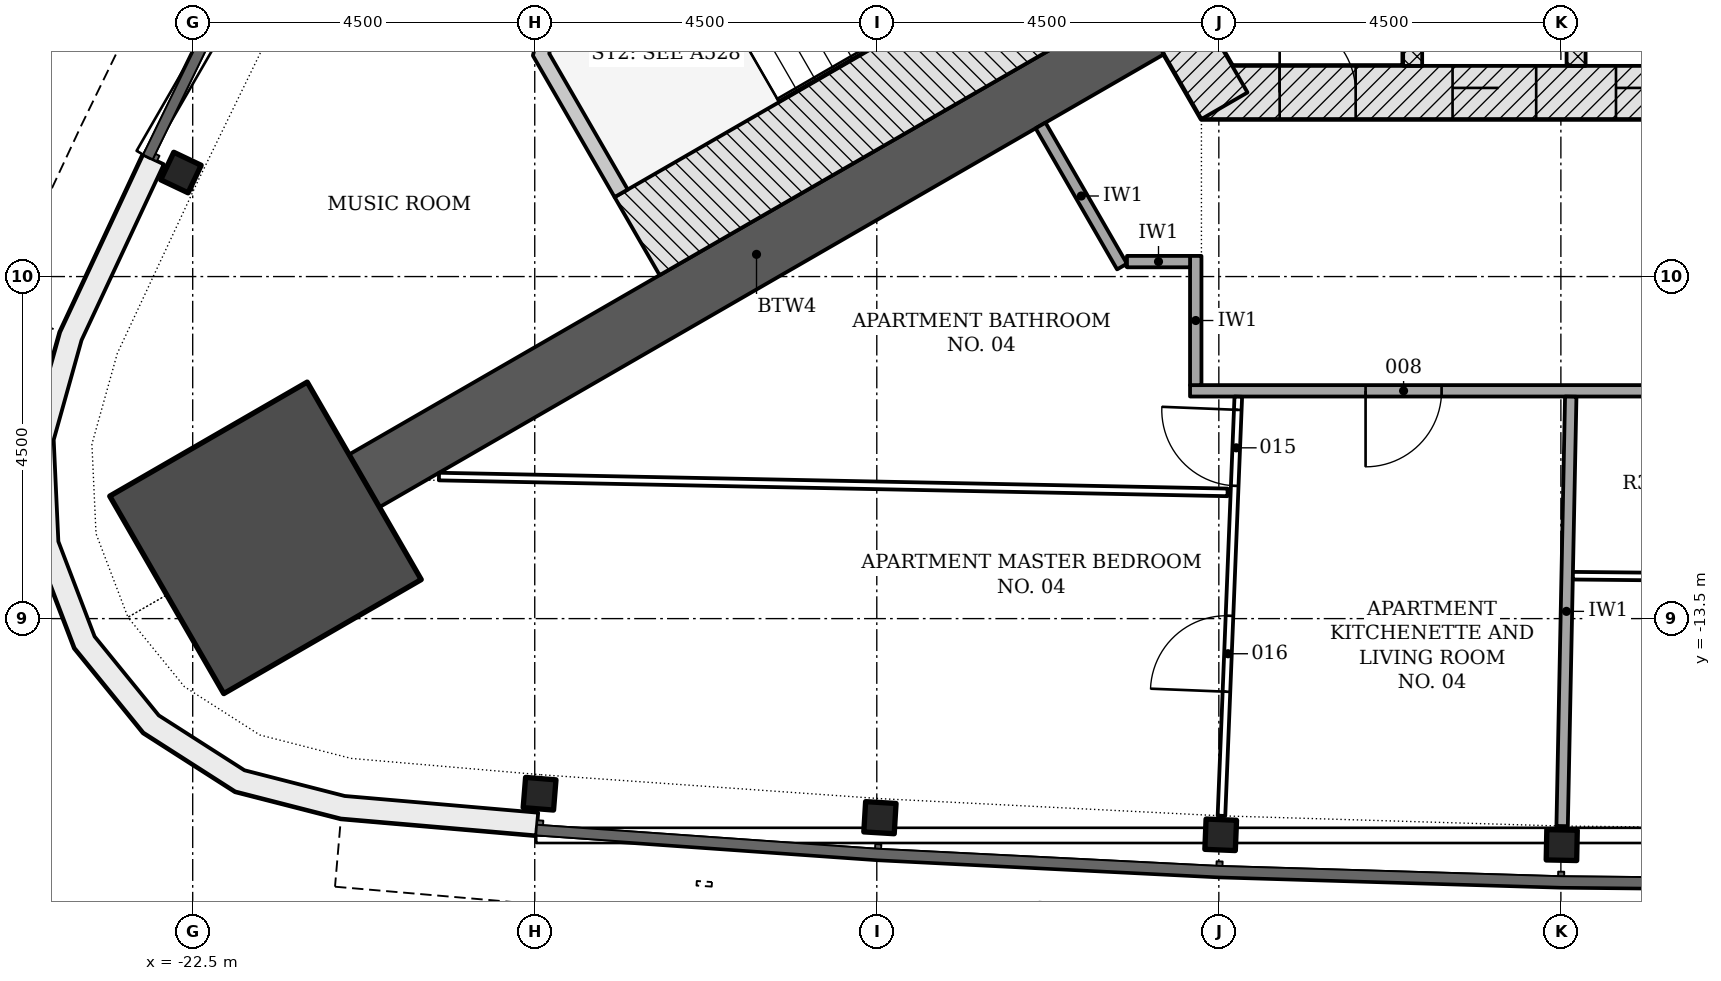
"""IFC4 building model, lengths in metres.
Left out: names, types, materials, properties, quantities, classifications, styles, units other than length and angle.
Written with IfcOpenShell. Run it as: python <this file> out.ifc"""

import sys

from ifc_helpers import new_model, si_unit, direction, frame, frame_2d, origin, origin_2d, place, context, subcontext, project, spatial, polyline, rectangle, i_section, outline, extrude, element, fill, save


model = new_model("IFC4")
c1 = context("Model", 3, precision=1e-05, world=origin(), true_north=direction((0.0, 1.0)))
c2 = subcontext(c1, "Body", "Model", "MODEL_VIEW")
j1 = project(units=[si_unit("LENGTHUNIT", "METRE"), si_unit("PLANEANGLEUNIT", "RADIAN")], contexts=[c1])
p1 = place(None, origin())
s1 = spatial("IfcSite", under=j1, at=p1, CompositionType="ELEMENT")
p2 = place(p1, origin())
s2 = spatial("IfcBuilding", under=s1, at=p2, CompositionType="ELEMENT")
p3 = place(p2, frame((0.0, 0.0, 109.5)))
s3 = spatial("IfcBuildingStorey", under=s2, at=p3, CompositionType="ELEMENT", Elevation=109.5)
p4 = place(p3, frame((-9.229, -6.578, -0.2), z_axis=(0.0, 0.0, 1.0), x_axis=(1.0, 0.0, 0.0)))
e1 = element("IfcWall", 1, at=p4, inside=s3, PredefinedType="SHEAR", context=c2, shape_type="SweptSolid", body=[
    extrude(rectangle(XDim=18.458, YDim=0.7, at=frame_2d((9.229, 0.0))), origin(), (0.0, 0.0, 1.0), 3.6),
])
p5 = place(p4, frame((3.304, 0.0, 0.2)))
e2 = element("IfcOpeningElement", 2, at=p5, cuts=e1, PredefinedType="OPENING", context=c2, shape_type="SweptSolid", body=[
    extrude(rectangle(XDim=1.1, YDim=2.1, at=frame_2d((0.55, 1.05))), frame((0.0, 0.36, 0.0), z_axis=(0.0, -1.0, 0.0), x_axis=(1.0, 0.0, 0.0)), (0.0, 0.0, 1.0), 0.72),
])
p6 = place(p4, frame((5.454, 0.0, 0.2)))
e3 = element("IfcOpeningElement", 3, at=p6, cuts=e1, PredefinedType="OPENING", context=c2, shape_type="SweptSolid", body=[
    extrude(rectangle(XDim=1.1, YDim=2.1, at=frame_2d((0.55, 1.05))), frame((0.0, 0.36, 0.0), z_axis=(0.0, -1.0, 0.0), x_axis=(1.0, 0.0, 0.0)), (0.0, 0.0, 1.0), 0.72),
])
p7 = place(p4, frame((7.604, 0.0, 0.2)))
e4 = element("IfcOpeningElement", 4, at=p7, cuts=e1, PredefinedType="OPENING", context=c2, shape_type="SweptSolid", body=[
    extrude(rectangle(XDim=1.1, YDim=2.1, at=frame_2d((0.55, 1.05))), frame((0.0, 0.36, 0.0), z_axis=(0.0, -1.0, 0.0), x_axis=(1.0, 0.0, 0.0)), (0.0, 0.0, 1.0), 0.72),
])
p8 = place(p4, frame((9.754, 0.0, 0.2)))
e5 = element("IfcOpeningElement", 5, at=p8, cuts=e1, PredefinedType="OPENING", context=c2, shape_type="SweptSolid", body=[
    extrude(rectangle(XDim=1.1, YDim=2.1, at=frame_2d((0.55, 1.05))), frame((0.0, 0.36, 0.0), z_axis=(0.0, -1.0, 0.0), x_axis=(1.0, 0.0, 0.0)), (0.0, 0.0, 1.0), 0.72),
])
p9 = place(p4, frame((11.904, 0.0, 0.2)))
e6 = element("IfcOpeningElement", 6, at=p9, cuts=e1, PredefinedType="OPENING", context=c2, shape_type="SweptSolid", body=[
    extrude(rectangle(XDim=1.1, YDim=2.1, at=frame_2d((0.55, 1.05))), frame((0.0, 0.36, 0.0), z_axis=(0.0, -1.0, 0.0), x_axis=(1.0, 0.0, 0.0)), (0.0, 0.0, 1.0), 0.72),
])
p10 = place(p4, frame((14.054, 0.0, 0.2)))
e7 = element("IfcOpeningElement", 7, at=p10, cuts=e1, PredefinedType="OPENING", context=c2, shape_type="SweptSolid", body=[
    extrude(rectangle(XDim=1.1, YDim=2.1, at=frame_2d((0.55, 1.05))), frame((0.0, 0.36, 0.0), z_axis=(0.0, -1.0, 0.0), x_axis=(1.0, 0.0, 0.0)), (0.0, 0.0, 1.0), 0.72),
])
p11 = place(p4, frame((1.029, 0.0, 0.2)))
e8 = element("IfcOpeningElement", 8, at=p11, cuts=e1, PredefinedType="OPENING", context=c2, shape_type="SweptSolid", body=[
    extrude(rectangle(XDim=1.0, YDim=2.1, at=frame_2d((0.5, 1.05))), frame((0.0, 0.36, 0.0), z_axis=(0.0, -1.0, 0.0), x_axis=(1.0, 0.0, 0.0)), (0.0, 0.0, 1.0), 0.72),
])
p12 = place(p3, frame((-10.311, -4.353, -0.2), z_axis=(0.0, 0.0, 1.0), x_axis=(0.500042739161, -0.866000726912, 0.0)))
e9 = element("IfcWall", 9, at=p12, inside=s3, PredefinedType="SHEAR", context=c2, shape_type="SweptSolid", body=[
    extrude(rectangle(XDim=2.771, YDim=0.7, at=frame_2d((1.386, 0.0))), origin(), (0.0, 0.0, 1.0), 3.6),
])
p13 = place(p3, frame((-9.922, -5.728, -0.2), z_axis=(0.0, 0.0, 1.0), x_axis=(-0.866027307971, -0.499996701837, 0.0)))
e10 = element("IfcWall", 10, at=p13, inside=s3, PredefinedType="SHEAR", context=c2, shape_type="SweptSolid", body=[
    extrude(rectangle(XDim=11.918, YDim=0.8, at=frame_2d((5.959, 0.0))), origin(), (0.0, 0.0, 1.0), 3.6),
])
p14 = place(p3, frame((-21.542, -12.438, -0.2), z_axis=(0.0, 0.0, 1.0), x_axis=(-0.866025403784, -0.5, 0.0)))
e11 = element("IfcColumn", 11, at=p14, inside=s3, PredefinedType="COLUMN", context=c2, shape_type="SweptSolid", body=[
    extrude(rectangle(XDim=3.0, YDim=3.0, at=origin_2d()), origin(), (0.0, 0.0, 1.0), 3.6),
])
for number, where, z_axis, x_axis in (
    (12, (-22.655, -7.632, -0.2), (0.0, 0.0, 1.0), (-0.429, -0.903, 0.0)),
    (13, (-17.937, -15.804, -0.2), (0.0, 0.0, 1.0), (0.997, -0.08, 0.0)),
    (14, (-13.459, -16.119, -0.2), (0.0, 0.0, 1.0), (0.998, -0.06, 0.0)),
    (15, (-8.976, -16.344, -0.2), (0.0, 0.0, 1.0), (0.999, -0.04, 0.0)),
    (16, (-4.489, -16.479, -0.2), (0.0, 0.0, 1.0), (1.0, -0.02, 0.0)),
):
    element("IfcColumn", number, at=place(p3, frame(where, z_axis=z_axis, x_axis=x_axis)), inside=s3, PredefinedType="COLUMN", context=c2, shape_type="SweptSolid", body=[
        extrude(i_section(OverallWidth=0.401, OverallDepth=0.399, WebThickness=0.025, FlangeThickness=0.04, FilletRadius=0.015, at=origin_2d()), origin(), (0.0, 0.0, 1.0), 3.6),
    ])
p15 = place(p3, origin())
e17 = element("IfcWall", 17, at=p15, inside=s3, PredefinedType="NOTDEFINED", context=c2, shape_type="SweptSolid", body=[
    extrude(outline(polyline([(-23.152, -7.396), (-24.245, -9.732), (-24.631, -11.114), (-24.565, -12.547), (-24.054, -13.887), (-23.148, -15.0), (-21.94, -15.774), (-20.551, -16.13), (-17.981, -16.352), (-17.955, -16.053), (-20.5, -15.833), (-21.819, -15.495), (-22.946, -14.774), (-23.791, -13.735), (-24.267, -12.485), (-24.329, -11.148), (-23.962, -9.837), (-22.88, -7.523), (-23.152, -7.396)])), origin(), (0.0, 0.0, 1.0), 3.3),
])
for number, where, z_axis, x_axis in (
    (18, (-6.45, -6.228, -0.2), (0.0, 0.0, 1.0), (0.0, 1.0, 0.0)),
    (19, (-4.3, -6.228, -0.2), (0.0, 0.0, 1.0), (0.0, 1.0, 0.0)),
):
    element("IfcWall", number, at=place(p3, frame(where, z_axis=z_axis, x_axis=x_axis)), inside=s3, PredefinedType="PARTITIONING", context=c2, shape_type="SweptSolid", body=[
        extrude(rectangle(XDim=2.5, YDim=0.25, at=frame_2d((1.25, 0.0))), origin(), (0.0, 0.0, 1.0), 3.6),
    ])
p16 = place(p3, frame((-10.418, -4.868, -0.2), z_axis=(0.0, 0.0, 1.0), x_axis=(-0.866018442252, -0.500012057535, 0.0)))
e20 = element("IfcWall", 20, at=p16, inside=s3, PredefinedType="SHEAR", context=c2, shape_type="SweptSolid", body=[
    extrude(rectangle(XDim=7.2, YDim=1.186, at=frame_2d((3.6, 0.0))), origin(), (0.0, 0.0, 1.0), 3.6),
])
p17 = place(p3, frame((0.0, 0.0, -0.2)))
e21 = element("IfcWall", 21, at=p17, inside=s3, PredefinedType="SHEAR", context=c2, shape_type="SweptSolid", body=[
    extrude(outline(polyline([(-17.439, -3.907), (-18.025, -6.093), (-16.95, -7.955), (-16.777, -7.855), (-17.81, -6.065), (-17.267, -4.039), (-17.339, -4.081), (-17.339, -4.081), (-17.339, -4.081), (-17.339, -4.081), (-17.339, -4.081), (-17.339, -4.081), (-17.339, -4.081), (-17.339, -4.081), (-17.339, -4.081), (-17.339, -4.081), (-17.339, -4.081), (-17.339, -4.081), (-17.339, -4.081), (-17.339, -4.081), (-17.339, -4.081), (-17.339, -4.081), (-17.339, -4.081), (-17.439, -3.907)])), origin(), (0.0, 0.0, 1.0), 3.6),
])
p18 = place(p3, frame((3.689, -10.503, 0.0), z_axis=(0.0, 0.0, 1.0), x_axis=(-1.0, 0.0, 0.0)))
e22 = element("IfcWall", 22, at=p18, inside=s3, PredefinedType="PARTITIONING", context=c2, shape_type="SweptSolid", body=[
    extrude(rectangle(XDim=13.068, YDim=0.15, at=frame_2d((6.534, 0.0))), origin(), (0.0, 0.0, 1.0), 2.847),
])
p19 = place(p18, frame((9.758, 0.0, 0.0)))
e23 = element("IfcOpeningElement", 23, at=p19, cuts=e22, PredefinedType="OPENING", context=c2, shape_type="SweptSolid", body=[
    extrude(rectangle(XDim=1.0, YDim=2.1, at=frame_2d((0.5, 1.05))), frame((0.0, 0.085, 0.0), z_axis=(0.0, -1.0, 0.0), x_axis=(1.0, 0.0, 0.0)), (0.0, 0.0, 1.0), 0.17),
])
p20 = place(p18, frame((4.177, 0.0, 0.0)))
e24 = element("IfcOpeningElement", 24, at=p20, cuts=e22, PredefinedType="OPENING", context=c2, shape_type="SweptSolid", body=[
    extrude(rectangle(XDim=1.0, YDim=2.1, at=frame_2d((0.5, 1.05))), frame((0.0, 0.085, 0.0), z_axis=(0.0, -1.0, 0.0), x_axis=(1.0, 0.0, 0.0)), (0.0, 0.0, 1.0), 0.17),
])
p21 = place(p3, frame((-11.345, -7.012, 0.0), z_axis=(0.0, 0.0, 1.0), x_axis=(0.499998569178, -0.866026229868, 0.0)))
e25 = element("IfcWall", 25, at=p21, inside=s3, PredefinedType="PARTITIONING", context=c2, shape_type="SweptSolid", body=[
    extrude(rectangle(XDim=2.143, YDim=0.15, at=frame_2d((1.072, 0.0))), origin(), (0.0, 0.0, 1.0), 3.4),
])
p22 = place(p3, frame((-9.304, -10.428, 0.0), z_axis=(0.0, 0.0, 1.0), x_axis=(0.0, 1.0, 0.0)))
e26 = element("IfcWall", 26, at=p22, inside=s3, PredefinedType="PARTITIONING", context=c2, shape_type="SweptSolid", body=[
    extrude(rectangle(XDim=1.7, YDim=0.15, at=frame_2d((0.85, 0.0))), origin(), (0.0, 0.0, 1.0), 3.4),
])
p23 = place(p3, frame((-10.209, -8.803, 0.0), z_axis=(0.0, 0.0, 1.0), x_axis=(1.0, 0.0, 0.0)))
e27 = element("IfcWall", 27, at=p23, inside=s3, PredefinedType="PARTITIONING", context=c2, shape_type="SweptSolid", body=[
    extrude(rectangle(XDim=0.83, YDim=0.15, at=frame_2d((0.415, 0.0))), origin(), (0.0, 0.0, 1.0), 3.4),
])
p24 = place(p3, frame((-4.484, -16.229, 0.0), z_axis=(0.0, 0.0, 1.0), x_axis=(0.020089281754, 0.999798190016, 0.0)))
e28 = element("IfcWall", 28, at=p24, inside=s3, PredefinedType="PARTITIONING", context=c2, shape_type="SweptSolid", body=[
    extrude(rectangle(XDim=5.651, YDim=0.15, at=frame_2d((2.826, 0.0))), origin(), (0.0, 0.0, 1.0), 2.847),
])
p25 = place(p3, frame((-8.885, -11.839, 0.0), z_axis=(0.0, 0.0, 1.0), x_axis=(-0.999798608679, 0.020068434987, 0.0)))
e29 = element("IfcWall", 29, at=p25, inside=s3, PredefinedType="PARTITIONING", context=c2, shape_type="SweptSolid", body=[
    extrude(rectangle(XDim=10.377, YDim=0.1, at=frame_2d((5.188, 0.0))), origin(), (0.0, 0.0, 1.0), 2.847),
])
p26 = place(p3, frame((-8.966, -16.094, 0.0), z_axis=(0.0, 0.0, 1.0), x_axis=(0.040167671745, 0.999192953411, 0.0)))
e30 = element("IfcWall", 30, at=p26, inside=s3, PredefinedType="PARTITIONING", context=c2, shape_type="SweptSolid", body=[
    extrude(rectangle(XDim=5.519, YDim=0.1, at=frame_2d((2.759, 0.0))), origin(), (0.0, 0.0, 1.0), 2.847),
])
p27 = place(p26, frame((4.345, 0.0, 0.0)))
e31 = element("IfcOpeningElement", 31, at=p27, cuts=e30, PredefinedType="OPENING", context=c2, shape_type="SweptSolid", body=[
    extrude(rectangle(XDim=1.0, YDim=2.1, at=frame_2d((0.5, 1.05))), frame((0.0, 0.06, 0.0), z_axis=(0.0, -1.0, 0.0), x_axis=(1.0, 0.0, 0.0)), (0.0, 0.0, 1.0), 0.12),
])
p28 = place(p26, frame((1.634, 0.0, 0.0)))
e32 = element("IfcOpeningElement", 32, at=p28, cuts=e30, PredefinedType="OPENING", context=c2, shape_type="SweptSolid", body=[
    extrude(rectangle(XDim=1.0, YDim=2.1, at=frame_2d((0.5, 1.05))), frame((0.0, 0.06, 0.0), z_axis=(0.0, -1.0, 0.0), x_axis=(1.0, 0.0, 0.0)), (0.0, 0.0, 1.0), 0.12),
])
p29 = place(p3, frame((-4.342, -12.936, 0.0), z_axis=(0.0, 0.0, 1.0), x_axis=(0.999949877213, -0.010012145693, 0.0)))
e33 = element("IfcWall", 33, at=p29, inside=s3, PredefinedType="PARTITIONING", context=c2, shape_type="SweptSolid", body=[
    extrude(rectangle(XDim=2.316, YDim=0.1, at=frame_2d((1.158, 0.0))), origin(), (0.0, 0.0, 1.0), 2.847),
])
p30 = place(p5, origin())
e34 = element("IfcDoor", 34, at=p30, inside=s3, OperationType="DOUBLE_DOOR_SLIDING", PredefinedType="DOOR", context=c2, shape_type="SweptSolid", body=[
    extrude(rectangle(XDim=1.1, YDim=2.1, at=frame_2d((0.55, 1.05))), frame((0.0, 0.025, 0.0), z_axis=(0.0, -1.0, 0.0), x_axis=(1.0, 0.0, 0.0)), (0.0, 0.0, 1.0), 0.05),
])
fill(e2, e34)
p31 = place(p6, origin())
e35 = element("IfcDoor", 35, at=p31, inside=s3, OperationType="DOUBLE_DOOR_SLIDING", PredefinedType="DOOR", context=c2, shape_type="SweptSolid", body=[
    extrude(rectangle(XDim=1.1, YDim=2.1, at=frame_2d((0.55, 1.05))), frame((0.0, 0.025, 0.0), z_axis=(0.0, -1.0, 0.0), x_axis=(1.0, 0.0, 0.0)), (0.0, 0.0, 1.0), 0.05),
])
fill(e3, e35)
p32 = place(p11, origin())
e36 = element("IfcDoor", 36, at=p32, inside=s3, OperationType="SINGLE_SWING_LEFT", PredefinedType="DOOR", context=c2, shape_type="SweptSolid", body=[
    extrude(rectangle(XDim=1.0, YDim=2.1, at=frame_2d((0.5, 1.05))), frame((0.0, 0.075, 0.0), z_axis=(0.0, -1.0, 0.0), x_axis=(1.0, 0.0, 0.0)), (0.0, 0.0, 1.0), 0.15),
])
fill(e8, e36)
p33 = place(p19, origin())
e37 = element("IfcDoor", 37, at=p33, inside=s3, OperationType="SINGLE_SWING_RIGHT", PredefinedType="DOOR", context=c2, shape_type="SweptSolid", body=[
    extrude(rectangle(XDim=1.0, YDim=2.1, at=frame_2d((0.5, 1.05))), frame((0.0, 0.025, 0.0), z_axis=(0.0, -1.0, 0.0), x_axis=(1.0, 0.0, 0.0)), (0.0, 0.0, 1.0), 0.05),
])
fill(e23, e37)
p34 = place(p27, origin())
e38 = element("IfcDoor", 38, at=p34, inside=s3, OperationType="SINGLE_SWING_RIGHT", PredefinedType="DOOR", context=c2, shape_type="SweptSolid", body=[
    extrude(rectangle(XDim=1.0, YDim=2.1, at=frame_2d((0.5, 1.05))), frame((0.0, 0.025, 0.0), z_axis=(0.0, -1.0, 0.0), x_axis=(1.0, 0.0, 0.0)), (0.0, 0.0, 1.0), 0.05),
])
fill(e31, e38)
p35 = place(p28, origin())
e39 = element("IfcDoor", 39, at=p35, inside=s3, OperationType="SINGLE_SWING_LEFT", PredefinedType="DOOR", context=c2, shape_type="SweptSolid", body=[
    extrude(rectangle(XDim=1.0, YDim=2.1, at=frame_2d((0.5, 1.05))), frame((0.0, 0.025, 0.0), z_axis=(0.0, -1.0, 0.0), x_axis=(1.0, 0.0, 0.0)), (0.0, 0.0, 1.0), 0.05),
])
fill(e32, e39)
save(model, sys.argv[1])
